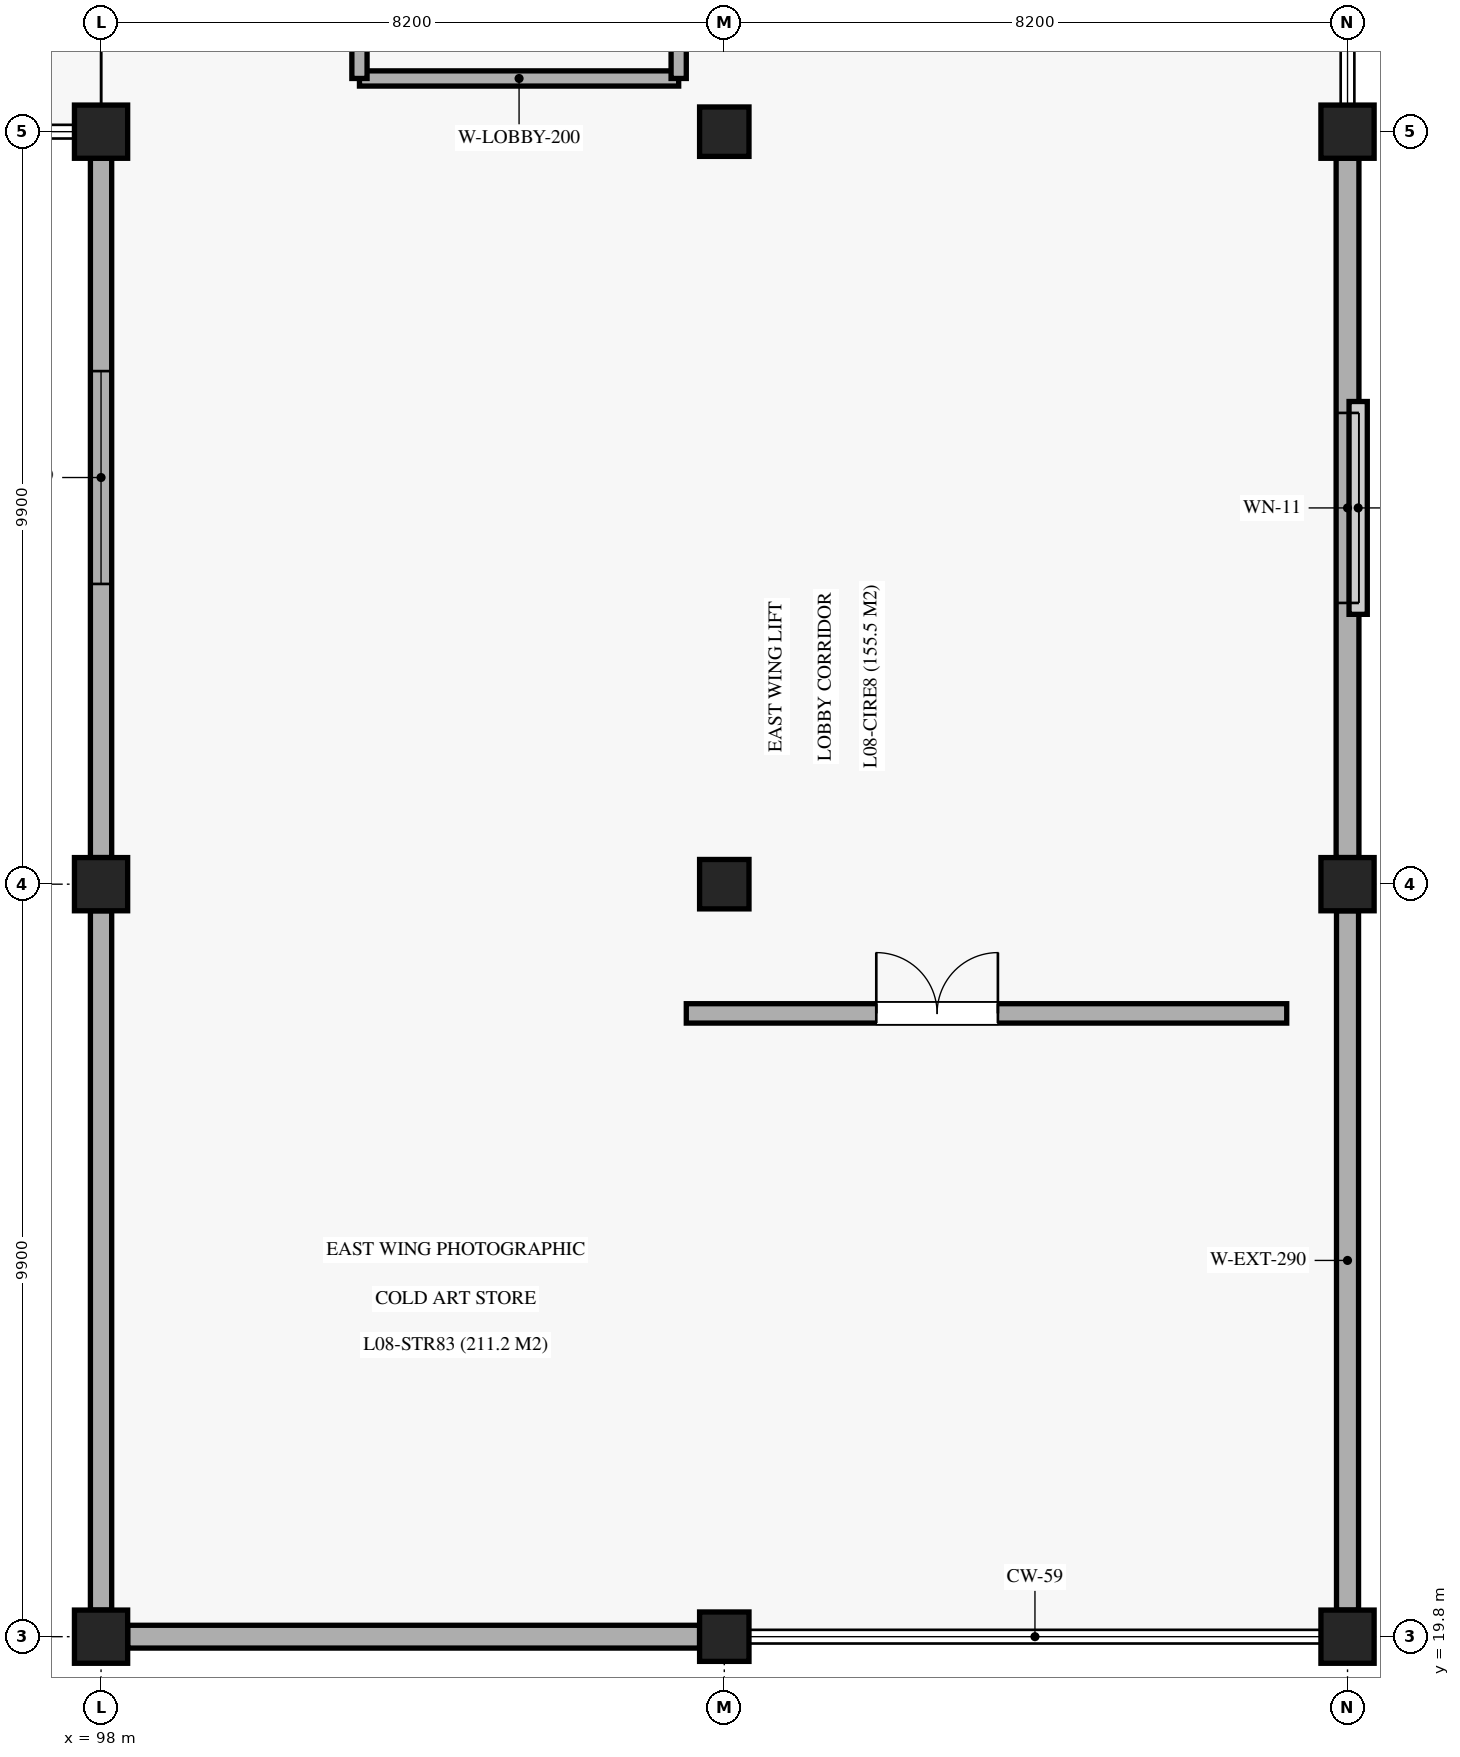
"""IFC4 building model, lengths in metres.
Left out: names, types, materials, properties, quantities, classifications, styles, units other than length and angle.
Written with IfcOpenShell. Run it as: python <this file> out.ifc"""

import sys

from ifc_helpers import new_model, si_unit, direction, frame, frame_2d, origin, origin_2d, place, context, subcontext, project, spatial, rectangle, extrude, element, fill, save


model = new_model("IFC4")
c1 = context("Model", 3, precision=1e-05, world=origin(), true_north=direction((0.0, 1.0)))
c2 = subcontext(c1, "Body", "Model", "MODEL_VIEW")
j1 = project(units=[si_unit("LENGTHUNIT", "METRE"), si_unit("PLANEANGLEUNIT", "RADIAN")], contexts=[c1])
p1 = place(None, origin())
s1 = spatial("IfcSite", under=j1, at=p1, CompositionType="ELEMENT")
p2 = place(p1, origin())
s2 = spatial("IfcBuilding", under=s1, at=p2, CompositionType="ELEMENT")
p3 = place(p2, frame((0.0, 0.0, 42.33)))
s3 = spatial("IfcBuildingStorey", under=s2, at=p3, CompositionType="ELEMENT", Elevation=42.33)
for number, where, z_axis, x_axis in (
    (1, (98.0, 19.8, 0.0), (0.0, 0.0, 1.0), (1.0, 0.0, 0.0)),
    (2, (98.0, 29.7, 0.0), (0.0, 0.0, 1.0), (1.0, 0.0, 0.0)),
    (3, (98.0, 39.6, 0.0), (0.0, 0.0, 1.0), (1.0, 0.0, 0.0)),
):
    element("IfcColumn", number, at=place(p3, frame(where, z_axis=z_axis, x_axis=x_axis)), inside=s3, PredefinedType="COLUMN", context=c2, shape_type="SweptSolid", body=[
        extrude(rectangle(XDim=0.7, YDim=0.7, at=origin_2d()), origin(), (0.0, 0.0, 1.0), 4.59),
    ])
for number, where, z_axis, x_axis in (
    (4, (106.2, 19.8, 0.0), (0.0, 0.0, 1.0), (1.0, 0.0, 0.0)),
    (5, (106.2, 29.7, 0.0), (0.0, 0.0, 1.0), (1.0, 0.0, 0.0)),
    (6, (106.2, 39.6, 0.0), (0.0, 0.0, 1.0), (1.0, 0.0, 0.0)),
):
    element("IfcColumn", number, at=place(p3, frame(where, z_axis=z_axis, x_axis=x_axis)), inside=s3, PredefinedType="COLUMN", context=c2, shape_type="SweptSolid", body=[
        extrude(rectangle(XDim=0.65, YDim=0.65, at=origin_2d()), origin(), (0.0, 0.0, 1.0), 4.59),
    ])
for number, where, z_axis, x_axis in (
    (7, (114.4, 19.8, 0.0), (0.0, 0.0, 1.0), (1.0, 0.0, 0.0)),
    (8, (114.4, 29.7, 0.0), (0.0, 0.0, 1.0), (1.0, 0.0, 0.0)),
    (9, (114.4, 39.6, 0.0), (0.0, 0.0, 1.0), (1.0, 0.0, 0.0)),
):
    element("IfcColumn", number, at=place(p3, frame(where, z_axis=z_axis, x_axis=x_axis)), inside=s3, PredefinedType="COLUMN", context=c2, shape_type="SweptSolid", body=[
        extrude(rectangle(XDim=0.7, YDim=0.7, at=origin_2d()), origin(), (0.0, 0.0, 1.0), 4.59),
    ])
p4 = place(p3, frame((98.0, 20.15, 0.0), z_axis=(0.0, 0.0, 1.0), x_axis=(0.0, 1.0, 0.0)))
e10 = element("IfcWall", 10, at=p4, inside=s3, PredefinedType="SOLIDWALL", context=c2, shape_type="SweptSolid", body=[
    extrude(rectangle(XDim=9.2, YDim=0.28, at=frame_2d((4.6, 0.0))), origin(), (0.0, 0.0, 1.0), 3.59),
])
p5 = place(p3, frame((114.4, 20.15, 0.0), z_axis=(0.0, 0.0, 1.0), x_axis=(0.0, 1.0, 0.0)))
e11 = element("IfcWall", 11, at=p5, inside=s3, PredefinedType="SOLIDWALL", context=c2, shape_type="SweptSolid", body=[
    extrude(rectangle(XDim=9.2, YDim=0.29, at=frame_2d((4.6, 0.0))), origin(), (0.0, 0.0, 1.0), 3.59),
])
p6 = place(p3, frame((98.0, 30.05, 0.0), z_axis=(0.0, 0.0, 1.0), x_axis=(0.0, 1.0, 0.0)))
e12 = element("IfcWall", 12, at=p6, inside=s3, PredefinedType="SOLIDWALL", context=c2, shape_type="SweptSolid", body=[
    extrude(rectangle(XDim=9.2, YDim=0.28, at=frame_2d((4.6, 0.0))), origin(), (0.0, 0.0, 1.0), 3.59),
])
p7 = place(p6, frame((3.6, 0.0, 1.45)))
e13 = element("IfcOpeningElement", 13, at=p7, cuts=e12, PredefinedType="OPENING", context=c2, shape_type="SweptSolid", body=[
    extrude(rectangle(XDim=2.8, YDim=1.9, at=frame_2d((1.4, 0.95))), frame((0.0, 0.15, 0.0), z_axis=(0.0, -1.0, 0.0), x_axis=(1.0, 0.0, 0.0)), (0.0, 0.0, 1.0), 0.3),
])
p8 = place(p3, frame((114.4, 30.05, 0.0), z_axis=(0.0, 0.0, 1.0), x_axis=(0.0, 1.0, 0.0)))
e14 = element("IfcWall", 14, at=p8, inside=s3, PredefinedType="SOLIDWALL", context=c2, shape_type="SweptSolid", body=[
    extrude(rectangle(XDim=9.2, YDim=0.3, at=frame_2d((4.6, 0.0))), origin(), (0.0, 0.0, 1.0), 3.59),
])
p9 = place(p8, frame((3.35, 0.0, 1.65)))
e15 = element("IfcOpeningElement", 15, at=p9, cuts=e14, PredefinedType="OPENING", context=c2, shape_type="SweptSolid", body=[
    extrude(rectangle(XDim=2.5, YDim=1.6, at=frame_2d((1.25, 0.8))), frame((0.0, 0.16, 0.0), z_axis=(0.0, -1.0, 0.0), x_axis=(1.0, 0.0, 0.0)), (0.0, 0.0, 1.0), 0.32),
])
p10 = place(p3, frame((98.35, 19.8, 0.0), z_axis=(0.0, 0.0, 1.0), x_axis=(1.0, 0.0, 0.0)))
e16 = element("IfcWall", 16, at=p10, inside=s3, PredefinedType="SOLIDWALL", context=c2, shape_type="SweptSolid", body=[
    extrude(rectangle(XDim=7.525, YDim=0.3, at=frame_2d((3.762, 0.0))), origin(), (0.0, 0.0, 1.0), 3.59),
])
p11 = place(p3, frame((101.4, 40.3, 0.0), z_axis=(0.0, 0.0, 1.0), x_axis=(1.0, 0.0, 0.0)))
e17 = element("IfcWall", 17, at=p11, inside=s3, PredefinedType="SOLIDWALL", context=c2, shape_type="SweptSolid", body=[
    extrude(rectangle(XDim=4.2, YDim=0.2, at=frame_2d((2.1, 0.0))), origin(), (0.0, 0.0, 1.0), 3.46),
])
p12 = place(p3, frame((101.4, 40.3, 0.0), z_axis=(0.0, 0.0, 1.0), x_axis=(0.0, 1.0, 0.0)))
e18 = element("IfcWall", 18, at=p12, inside=s3, PredefinedType="SOLIDWALL", context=c2, shape_type="SweptSolid", body=[
    extrude(rectangle(XDim=2.5, YDim=0.2, at=frame_2d((1.25, 0.0))), origin(), (0.0, 0.0, 1.0), 3.46),
])
p13 = place(p3, frame((105.6, 40.3, 0.0), z_axis=(0.0, 0.0, 1.0), x_axis=(0.0, 1.0, 0.0)))
e19 = element("IfcWall", 19, at=p13, inside=s3, PredefinedType="SOLIDWALL", context=c2, shape_type="SweptSolid", body=[
    extrude(rectangle(XDim=7.7, YDim=0.2, at=frame_2d((3.85, 0.0))), origin(), (0.0, 0.0, 1.0), 3.46),
])
p14 = place(p3, frame((105.7, 28.0, 0.0), z_axis=(0.0, 0.0, 1.0), x_axis=(1.0, 0.0, 0.0)))
e20 = element("IfcWall", 20, at=p14, inside=s3, PredefinedType="SOLIDWALL", context=c2, shape_type="SweptSolid", body=[
    extrude(rectangle(XDim=7.9, YDim=0.255, at=frame_2d((3.95, 0.0))), origin(), (0.0, 0.0, 1.0), 3.46),
])
p15 = place(p14, frame((2.5, 0.0, 0.0)))
e21 = element("IfcOpeningElement", 21, at=p15, cuts=e20, PredefinedType="OPENING", context=c2, shape_type="SweptSolid", body=[
    extrude(rectangle(XDim=1.6, YDim=2.3, at=frame_2d((0.8, 1.15))), frame((0.0, 0.137, 0.0), z_axis=(0.0, -1.0, 0.0), x_axis=(1.0, 0.0, 0.0)), (0.0, 0.0, 1.0), 0.275),
])
p16 = place(p7, origin())
e22 = element("IfcWindow", 22, at=p16, inside=s3, PartitioningType="SINGLE_PANEL", PredefinedType="WINDOW", context=c2, shape_type="SweptSolid", body=[
    extrude(rectangle(XDim=2.8, YDim=1.9, at=frame_2d((1.4, 0.95))), frame((0.0, 0.03, 0.0), z_axis=(0.0, -1.0, 0.0), x_axis=(1.0, 0.0, 0.0)), (0.0, 0.0, 1.0), 0.06),
])
fill(e13, e22)
p17 = place(p9, origin())
e23 = element("IfcWindow", 23, at=p17, inside=s3, PartitioningType="SINGLE_PANEL", PredefinedType="WINDOW", context=c2, shape_type="SweptSolid", body=[
    extrude(rectangle(XDim=2.5, YDim=1.6, at=frame_2d((1.25, 0.8))), frame((0.0, 0.03, 0.0), z_axis=(0.0, -1.0, 0.0), x_axis=(1.0, 0.0, 0.0)), (0.0, 0.0, 1.0), 0.06),
])
fill(e15, e23)
p18 = place(p15, origin())
e24 = element("IfcDoor", 24, at=p18, inside=s3, OperationType="DOUBLE_DOOR_SINGLE_SWING", PredefinedType="DOOR", context=c2, shape_type="SweptSolid", body=[
    extrude(rectangle(XDim=1.6, YDim=2.3, at=frame_2d((0.8, 1.15))), frame((0.0, 0.025, 0.0), z_axis=(0.0, -1.0, 0.0), x_axis=(1.0, 0.0, 0.0)), (0.0, 0.0, 1.0), 0.05),
])
fill(e21, e24)
save(model, sys.argv[1])
